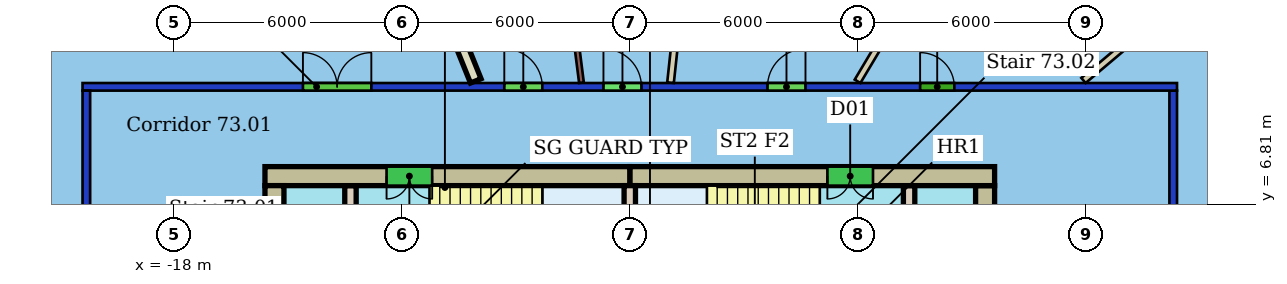
"""IFC4 building model, lengths in metres.
Left out: names, types, materials, properties, quantities, classifications, styles, units other than length and angle.
Written with IfcOpenShell. Run it as: python <this file> out.ifc"""

import sys

from ifc_helpers import new_model, si_unit, direction, frame, frame_2d, origin, place, context, subcontext, project, spatial, rectangle, extrude, element, fill, save


model = new_model("IFC4")
c1 = context("Model", 3, precision=1e-05, world=origin(), true_north=direction((0.0, 1.0)))
c2 = subcontext(c1, "Body", "Model", "MODEL_VIEW")
j1 = project(units=[si_unit("LENGTHUNIT", "METRE"), si_unit("PLANEANGLEUNIT", "RADIAN")], contexts=[c1])
p1 = place(None, origin())
s1 = spatial("IfcSite", under=j1, at=p1, CompositionType="ELEMENT")
p2 = place(p1, origin())
s2 = spatial("IfcBuilding", under=s1, at=p2, CompositionType="ELEMENT")
p3 = place(p2, frame((0.0, 0.0, 293.7)))
s3 = spatial("IfcBuildingStorey", under=s2, at=p3, CompositionType="ELEMENT", Elevation=293.7)
p4 = place(p3, frame((-20.3, -9.8, 0.0), z_axis=(0.0, 0.0, 1.0), x_axis=(0.0, 1.0, 0.0)))
e1 = element("IfcWall", 1, at=p4, inside=s3, PredefinedType="PARTITIONING", context=c2, shape_type="SweptSolid", body=[
    extrude(rectangle(XDim=19.6, YDim=0.2, at=frame_2d((9.8, 0.0))), origin(), (0.0, 0.0, 1.0), 3.1),
])
p5 = place(p4, frame((8.147, 0.0, 0.0)))
e2 = element("IfcOpeningElement", 2, at=p5, cuts=e1, PredefinedType="OPENING", context=c2, shape_type="SweptSolid", body=[
    extrude(rectangle(XDim=1.5, YDim=2.1, at=frame_2d((0.75, 1.05))), frame((0.0, 0.11, 0.0), z_axis=(0.0, -1.0, 0.0), x_axis=(1.0, 0.0, 0.0)), (0.0, 0.0, 1.0), 0.22),
])
p6 = place(p4, frame((4.031, 0.0, 0.0)))
e3 = element("IfcOpeningElement", 3, at=p6, cuts=e1, PredefinedType="OPENING", context=c2, shape_type="SweptSolid", body=[
    extrude(rectangle(XDim=1.0, YDim=2.1, at=frame_2d((0.5, 1.05))), frame((0.0, 0.11, 0.0), z_axis=(0.0, -1.0, 0.0), x_axis=(1.0, 0.0, 0.0)), (0.0, 0.0, 1.0), 0.22),
])
p7 = place(p3, frame((-20.4, 9.9, 0.0), z_axis=(0.0, 0.0, 1.0), x_axis=(1.0, 0.0, 0.0)))
e4 = element("IfcWall", 4, at=p7, inside=s3, PredefinedType="PARTITIONING", context=c2, shape_type="SweptSolid", body=[
    extrude(rectangle(XDim=28.8, YDim=0.2, at=frame_2d((14.4, 0.0))), origin(), (0.0, 0.0, 1.0), 3.1),
])
p8 = place(p7, frame((13.707, 0.0, 0.0)))
e5 = element("IfcOpeningElement", 5, at=p8, cuts=e4, PredefinedType="OPENING", context=c2, shape_type="SweptSolid", body=[
    extrude(rectangle(XDim=1.0, YDim=2.4, at=frame_2d((0.5, 1.2))), frame((0.0, 0.11, 0.0), z_axis=(0.0, -1.0, 0.0), x_axis=(1.0, 0.0, 0.0)), (0.0, 0.0, 1.0), 0.22),
])
p9 = place(p7, frame((11.098, 0.0, 0.0)))
e6 = element("IfcOpeningElement", 6, at=p9, cuts=e4, PredefinedType="OPENING", context=c2, shape_type="SweptSolid", body=[
    extrude(rectangle(XDim=1.0, YDim=2.1, at=frame_2d((0.5, 1.05))), frame((0.0, 0.11, 0.0), z_axis=(0.0, -1.0, 0.0), x_axis=(1.0, 0.0, 0.0)), (0.0, 0.0, 1.0), 0.22),
])
p10 = place(p7, frame((5.799, 0.0, 0.0)))
e7 = element("IfcOpeningElement", 7, at=p10, cuts=e4, PredefinedType="OPENING", context=c2, shape_type="SweptSolid", body=[
    extrude(rectangle(XDim=1.8, YDim=2.4, at=frame_2d((0.9, 1.2))), frame((0.0, 0.11, 0.0), z_axis=(0.0, -1.0, 0.0), x_axis=(1.0, 0.0, 0.0)), (0.0, 0.0, 1.0), 0.22),
])
p11 = place(p7, frame((22.04, 0.0, 0.0)))
e8 = element("IfcOpeningElement", 8, at=p11, cuts=e4, PredefinedType="OPENING", context=c2, shape_type="SweptSolid", body=[
    extrude(rectangle(XDim=0.9, YDim=2.1, at=frame_2d((0.45, 1.05))), frame((0.0, 0.11, 0.0), z_axis=(0.0, -1.0, 0.0), x_axis=(1.0, 0.0, 0.0)), (0.0, 0.0, 1.0), 0.22),
])
p12 = place(p7, frame((18.023, 0.0, 0.0)))
e9 = element("IfcOpeningElement", 9, at=p12, cuts=e4, PredefinedType="OPENING", context=c2, shape_type="SweptSolid", body=[
    extrude(rectangle(XDim=1.0, YDim=2.1, at=frame_2d((0.5, 1.05))), frame((0.0, 0.11, 0.0), z_axis=(0.0, -1.0, 0.0), x_axis=(1.0, 0.0, 0.0)), (0.0, 0.0, 1.0), 0.22),
])
p13 = place(p3, frame((8.3, 9.8, 0.0), z_axis=(0.0, 0.0, 1.0), x_axis=(0.0, -1.0, 0.0)))
e10 = element("IfcWall", 10, at=p13, inside=s3, PredefinedType="PARTITIONING", context=c2, shape_type="SweptSolid", body=[
    extrude(rectangle(XDim=19.6, YDim=0.2, at=frame_2d((9.8, 0.0))), origin(), (0.0, 0.0, 1.0), 3.1),
])
p14 = place(p13, frame((8.302, 0.0, 0.0)))
e11 = element("IfcOpeningElement", 11, at=p14, cuts=e10, PredefinedType="OPENING", context=c2, shape_type="SweptSolid", body=[
    extrude(rectangle(XDim=0.9, YDim=2.1, at=frame_2d((0.45, 1.05))), frame((0.0, 0.11, 0.0), z_axis=(0.0, -1.0, 0.0), x_axis=(1.0, 0.0, 0.0)), (0.0, 0.0, 1.0), 0.22),
])
p15 = place(p13, frame((3.681, 0.0, 0.0)))
e12 = element("IfcOpeningElement", 12, at=p15, cuts=e10, PredefinedType="OPENING", context=c2, shape_type="SweptSolid", body=[
    extrude(rectangle(XDim=1.5, YDim=2.4, at=frame_2d((0.75, 1.2))), frame((0.0, 0.11, 0.0), z_axis=(0.0, -1.0, 0.0), x_axis=(1.0, 0.0, 0.0)), (0.0, 0.0, 1.0), 0.22),
])
p16 = place(p3, frame((-3.459, 23.717, 0.0), z_axis=(0.0, 0.0, 1.0), x_axis=(-0.10651999257, -0.994310560732, 0.0)))
e13 = element("IfcWall", 13, at=p16, inside=s3, PredefinedType="PARTITIONING", context=c2, shape_type="SweptSolid", body=[
    extrude(rectangle(XDim=13.786, YDim=0.175, at=frame_2d((6.893, 0.0))), origin(), (0.0, 0.0, 1.0), 3.45),
])
p17 = place(p3, frame((-8.885, 22.716, 0.0), z_axis=(0.0, 0.0, 1.0), x_axis=(0.125993078933, -0.99203112051, 0.0)))
e14 = element("IfcWall", 14, at=p17, inside=s3, PredefinedType="PARTITIONING", context=c2, shape_type="SweptSolid", body=[
    extrude(rectangle(XDim=12.81, YDim=0.125, at=frame_2d((6.405, 0.0))), origin(), (0.0, 0.0, 1.0), 3.45),
])
p18 = place(p3, frame((-14.126, 20.166, 0.0), z_axis=(0.0, 0.0, 1.0), x_axis=(0.373780009818, -0.927517387579, 0.0)))
e15 = element("IfcWall", 15, at=p18, inside=s3, PredefinedType="PARTITIONING", context=c2, shape_type="SweptSolid", body=[
    extrude(rectangle(XDim=10.899, YDim=0.3, at=frame_2d((5.45, 0.0))), origin(), (0.0, 0.0, 1.0), 3.45),
])
p19 = place(p3, frame((11.902, 15.095, 0.0), z_axis=(0.0, 0.0, 1.0), x_axis=(-0.764496313842, -0.644628099079, 0.0)))
e16 = element("IfcWall", 16, at=p19, inside=s3, PredefinedType="PARTITIONING", context=c2, shape_type="SweptSolid", body=[
    extrude(rectangle(XDim=7.801, YDim=0.175, at=frame_2d((3.9, 0.0))), origin(), (0.0, 0.0, 1.0), 3.45),
])
p20 = place(p3, frame((6.496, 20.94, 0.0), z_axis=(0.0, 0.0, 1.0), x_axis=(-0.512439887576, -0.858723099503, 0.0)))
e17 = element("IfcWall", 17, at=p20, inside=s3, PredefinedType="PARTITIONING", context=c2, shape_type="SweptSolid", body=[
    extrude(rectangle(XDim=12.688, YDim=0.175, at=frame_2d((6.344, 0.0))), origin(), (0.0, 0.0, 1.0), 3.45),
])
p21 = place(p3, frame((3.6, 7.55, 0.0), z_axis=(0.0, 0.0, 1.0), x_axis=(-1.0, 0.0, 0.0)))
e18 = element("IfcWall", 18, at=p21, inside=s3, PredefinedType="SHEAR", context=c2, shape_type="SweptSolid", body=[
    extrude(rectangle(XDim=9.6, YDim=0.5, at=frame_2d((4.8, 0.0))), origin(), (0.0, 0.0, 1.0), 3.3),
])
p22 = place(p21, frame((3.2, 0.0, 0.0)))
e19 = element("IfcOpeningElement", 19, at=p22, cuts=e18, PredefinedType="OPENING", context=c2, shape_type="SweptSolid", body=[
    extrude(rectangle(XDim=1.2, YDim=2.1, at=frame_2d((0.6, 1.05))), frame((0.0, 0.26, 0.0), z_axis=(0.0, -1.0, 0.0), x_axis=(1.0, 0.0, 0.0)), (0.0, 0.0, 1.0), 0.52),
])
p23 = place(p3, frame((-6.0, 7.55, 0.0), z_axis=(0.0, 0.0, 1.0), x_axis=(-1.0, 0.0, 0.0)))
e20 = element("IfcWall", 20, at=p23, inside=s3, PredefinedType="SHEAR", context=c2, shape_type="SweptSolid", body=[
    extrude(rectangle(XDim=9.6, YDim=0.5, at=frame_2d((4.8, 0.0))), origin(), (0.0, 0.0, 1.0), 3.3),
])
p24 = place(p23, frame((5.2, 0.0, 0.0)))
e21 = element("IfcOpeningElement", 21, at=p24, cuts=e20, PredefinedType="OPENING", context=c2, shape_type="SweptSolid", body=[
    extrude(rectangle(XDim=1.2, YDim=2.1, at=frame_2d((0.6, 1.05))), frame((0.0, 0.26, 0.0), z_axis=(0.0, -1.0, 0.0), x_axis=(1.0, 0.0, 0.0)), (0.0, 0.0, 1.0), 0.52),
])
p25 = place(p3, frame((-15.35, 7.3, 0.0), z_axis=(0.0, 0.0, 1.0), x_axis=(0.0, -1.0, 0.0)))
e22 = element("IfcWall", 22, at=p25, inside=s3, PredefinedType="SHEAR", context=c2, shape_type="SweptSolid", body=[
    extrude(rectangle(XDim=14.6, YDim=0.5, at=frame_2d((7.3, 0.0))), origin(), (0.0, 0.0, 1.0), 3.3),
])
p26 = place(p25, frame((10.6, 0.0, 0.0)))
e23 = element("IfcOpeningElement", 23, at=p26, cuts=e22, PredefinedType="OPENING", context=c2, shape_type="SweptSolid", body=[
    extrude(rectangle(XDim=1.2, YDim=2.1, at=frame_2d((0.6, 1.05))), frame((0.0, 0.26, 0.0), z_axis=(0.0, -1.0, 0.0), x_axis=(1.0, 0.0, 0.0)), (0.0, 0.0, 1.0), 0.52),
])
p27 = place(p25, frame((2.8, 0.0, 0.0)))
e24 = element("IfcOpeningElement", 24, at=p27, cuts=e22, PredefinedType="OPENING", context=c2, shape_type="SweptSolid", body=[
    extrude(rectangle(XDim=1.2, YDim=2.1, at=frame_2d((0.6, 1.05))), frame((0.0, 0.26, 0.0), z_axis=(0.0, -1.0, 0.0), x_axis=(1.0, 0.0, 0.0)), (0.0, 0.0, 1.0), 0.52),
])
p28 = place(p3, frame((3.35, -7.3, 0.0), z_axis=(0.0, 0.0, 1.0), x_axis=(0.0, 1.0, 0.0)))
e25 = element("IfcWall", 25, at=p28, inside=s3, PredefinedType="SHEAR", context=c2, shape_type="SweptSolid", body=[
    extrude(rectangle(XDim=14.6, YDim=0.5, at=frame_2d((7.3, 0.0))), origin(), (0.0, 0.0, 1.0), 3.3),
])
p29 = place(p28, frame((2.8, 0.0, 0.0)))
e26 = element("IfcOpeningElement", 26, at=p29, cuts=e25, PredefinedType="OPENING", context=c2, shape_type="SweptSolid", body=[
    extrude(rectangle(XDim=1.2, YDim=2.1, at=frame_2d((0.6, 1.05))), frame((0.0, 0.26, 0.0), z_axis=(0.0, -1.0, 0.0), x_axis=(1.0, 0.0, 0.0)), (0.0, 0.0, 1.0), 0.52),
])
p30 = place(p28, frame((10.6, 0.0, 0.0)))
e27 = element("IfcOpeningElement", 27, at=p30, cuts=e25, PredefinedType="OPENING", context=c2, shape_type="SweptSolid", body=[
    extrude(rectangle(XDim=1.2, YDim=2.1, at=frame_2d((0.6, 1.05))), frame((0.0, 0.26, 0.0), z_axis=(0.0, -1.0, 0.0), x_axis=(1.0, 0.0, 0.0)), (0.0, 0.0, 1.0), 0.52),
])
p31 = place(p3, frame((-13.35, 7.3, 0.0), z_axis=(0.0, 0.0, 1.0), x_axis=(0.0, -1.0, 0.0)))
e28 = element("IfcWall", 28, at=p31, inside=s3, PredefinedType="SHEAR", context=c2, shape_type="SweptSolid", body=[
    extrude(rectangle(XDim=14.6, YDim=0.3, at=frame_2d((7.3, 0.0))), origin(), (0.0, 0.0, 1.0), 3.3),
])
p32 = place(p31, frame((6.55, 0.0, 0.0)))
e29 = element("IfcOpeningElement", 29, at=p32, cuts=e28, PredefinedType="OPENING", context=c2, shape_type="SweptSolid", body=[
    extrude(rectangle(XDim=1.5, YDim=2.1, at=frame_2d((0.75, 1.05))), frame((0.0, 0.16, 0.0), z_axis=(0.0, -1.0, 0.0), x_axis=(1.0, 0.0, 0.0)), (0.0, 0.0, 1.0), 0.32),
])
p33 = place(p3, frame((1.35, -7.3, 0.0), z_axis=(0.0, 0.0, 1.0), x_axis=(0.0, 1.0, 0.0)))
e30 = element("IfcWall", 30, at=p33, inside=s3, PredefinedType="SHEAR", context=c2, shape_type="SweptSolid", body=[
    extrude(rectangle(XDim=14.6, YDim=0.3, at=frame_2d((7.3, 0.0))), origin(), (0.0, 0.0, 1.0), 3.3),
])
p34 = place(p33, frame((1.21, 0.0, 0.0)))
e31 = element("IfcOpeningElement", 31, at=p34, cuts=e30, PredefinedType="OPENING", context=c2, shape_type="SweptSolid", body=[
    extrude(rectangle(XDim=1.0, YDim=2.1, at=frame_2d((0.5, 1.05))), frame((0.0, 0.16, 0.0), z_axis=(0.0, -1.0, 0.0), x_axis=(1.0, 0.0, 0.0)), (0.0, 0.0, 1.0), 0.32),
])
p35 = place(p33, frame((6.55, 0.0, 0.0)))
e32 = element("IfcOpeningElement", 32, at=p35, cuts=e30, PredefinedType="OPENING", context=c2, shape_type="SweptSolid", body=[
    extrude(rectangle(XDim=1.5, YDim=2.1, at=frame_2d((0.75, 1.05))), frame((0.0, 0.16, 0.0), z_axis=(0.0, -1.0, 0.0), x_axis=(1.0, 0.0, 0.0)), (0.0, 0.0, 1.0), 0.32),
])
p36 = place(p3, frame((-6.0, 3.88, 0.0), z_axis=(0.0, 0.0, 1.0), x_axis=(0.0, 1.0, 0.0)))
e33 = element("IfcWall", 33, at=p36, inside=s3, PredefinedType="SHEAR", context=c2, shape_type="SweptSolid", body=[
    extrude(rectangle(XDim=3.42, YDim=0.3, at=frame_2d((1.71, 0.0))), origin(), (0.0, 0.0, 1.0), 3.3),
])
p37 = place(p8, origin())
e34 = element("IfcDoor", 34, at=p37, inside=s3, OperationType="SINGLE_SWING_LEFT", PredefinedType="DOOR", context=c2, shape_type="SweptSolid", body=[
    extrude(rectangle(XDim=1.0, YDim=2.4, at=frame_2d((0.5, 1.2))), frame((0.0, 0.025, 0.0), z_axis=(0.0, -1.0, 0.0), x_axis=(1.0, 0.0, 0.0)), (0.0, 0.0, 1.0), 0.05),
])
fill(e5, e34)
p38 = place(p9, origin())
e35 = element("IfcDoor", 35, at=p38, inside=s3, OperationType="SINGLE_SWING_LEFT", PredefinedType="DOOR", context=c2, shape_type="SweptSolid", body=[
    extrude(rectangle(XDim=1.0, YDim=2.1, at=frame_2d((0.5, 1.05))), frame((0.0, 0.025, 0.0), z_axis=(0.0, -1.0, 0.0), x_axis=(1.0, 0.0, 0.0)), (0.0, 0.0, 1.0), 0.05),
])
fill(e6, e35)
p39 = place(p10, origin())
e36 = element("IfcDoor", 36, at=p39, inside=s3, OperationType="DOUBLE_DOOR_SINGLE_SWING", PredefinedType="DOOR", context=c2, shape_type="SweptSolid", body=[
    extrude(rectangle(XDim=1.8, YDim=2.4, at=frame_2d((0.9, 1.2))), frame((0.0, 0.025, 0.0), z_axis=(0.0, -1.0, 0.0), x_axis=(1.0, 0.0, 0.0)), (0.0, 0.0, 1.0), 0.05),
])
fill(e7, e36)
p40 = place(p11, origin())
e37 = element("IfcDoor", 37, at=p40, inside=s3, OperationType="SINGLE_SWING_LEFT", PredefinedType="DOOR", context=c2, shape_type="SweptSolid", body=[
    extrude(rectangle(XDim=0.9, YDim=2.1, at=frame_2d((0.45, 1.05))), frame((0.0, 0.025, 0.0), z_axis=(0.0, -1.0, 0.0), x_axis=(1.0, 0.0, 0.0)), (0.0, 0.0, 1.0), 0.05),
])
fill(e8, e37)
p41 = place(p12, origin())
e38 = element("IfcDoor", 38, at=p41, inside=s3, OperationType="SINGLE_SWING_RIGHT", PredefinedType="DOOR", context=c2, shape_type="SweptSolid", body=[
    extrude(rectangle(XDim=1.0, YDim=2.1, at=frame_2d((0.5, 1.05))), frame((0.0, 0.025, 0.0), z_axis=(0.0, -1.0, 0.0), x_axis=(1.0, 0.0, 0.0)), (0.0, 0.0, 1.0), 0.05),
])
fill(e9, e38)
p42 = place(p22, origin())
e39 = element("IfcDoor", 39, at=p42, inside=s3, OperationType="DOUBLE_DOOR_SINGLE_SWING", PredefinedType="NOTDEFINED", context=c2, shape_type="SweptSolid", body=[
    extrude(rectangle(XDim=1.2, YDim=2.1, at=frame_2d((0.6, 1.05))), frame((0.0, 0.025, 0.0), z_axis=(0.0, -1.0, 0.0), x_axis=(1.0, 0.0, 0.0)), (0.0, 0.0, 1.0), 0.05),
])
fill(e19, e39)
p43 = place(p24, origin())
e40 = element("IfcDoor", 40, at=p43, inside=s3, OperationType="DOUBLE_DOOR_SINGLE_SWING", PredefinedType="NOTDEFINED", context=c2, shape_type="SweptSolid", body=[
    extrude(rectangle(XDim=1.2, YDim=2.1, at=frame_2d((0.6, 1.05))), frame((0.0, 0.025, 0.0), z_axis=(0.0, -1.0, 0.0), x_axis=(1.0, 0.0, 0.0)), (0.0, 0.0, 1.0), 0.05),
])
fill(e21, e40)
save(model, sys.argv[1])
